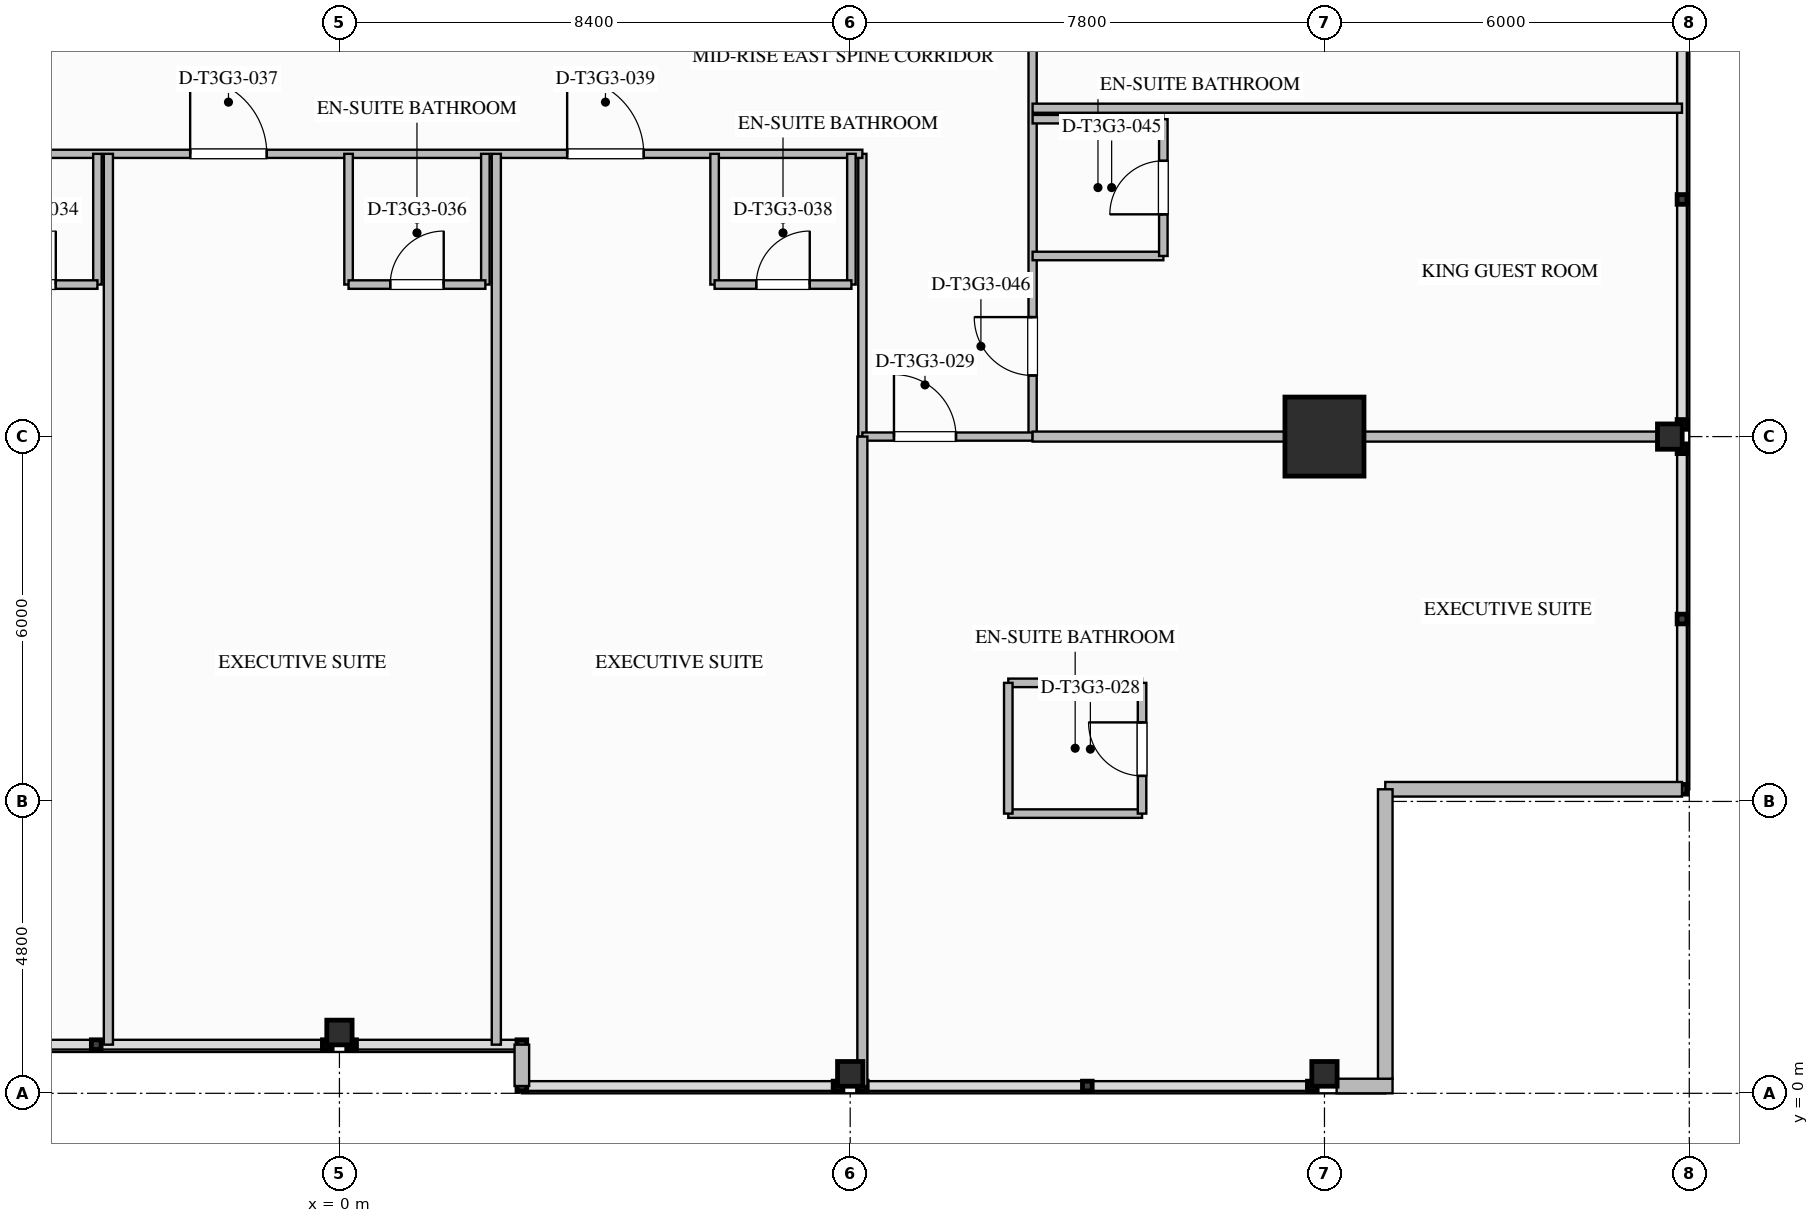
"""IFC4 building model, lengths in metres.
Left out: names, types, materials, properties, quantities, classifications, styles, units other than length and angle.
Written with IfcOpenShell. Run it as: python <this file> out.ifc"""

import sys

from ifc_helpers import new_model, si_unit, direction, frame, frame_2d, origin, origin_2d, place, context, subcontext, project, spatial, rectangle, i_section, extrude, element, fill, save


model = new_model("IFC4")
c1 = context("Model", 3, precision=1e-05, world=origin(), true_north=direction((0.0, 1.0)))
c2 = subcontext(c1, "Body", "Model", "MODEL_VIEW")
j1 = project(units=[si_unit("LENGTHUNIT", "METRE"), si_unit("PLANEANGLEUNIT", "RADIAN")], contexts=[c1])
p1 = place(None, origin())
s1 = spatial("IfcSite", under=j1, at=p1, CompositionType="ELEMENT")
p2 = place(p1, origin())
s2 = spatial("IfcBuilding", under=s1, at=p2, CompositionType="ELEMENT")
p3 = place(p2, frame((0.0, 0.0, 171.7)))
s3 = spatial("IfcBuildingStorey", under=s2, at=p3, CompositionType="ELEMENT", Elevation=171.7)
p4 = place(p3, frame((16.2, 10.8, 0.0), z_axis=(0.0, 0.0, 1.0), x_axis=(1.0, 0.0, 0.0)))
e1 = element("IfcColumn", 1, at=p4, inside=s3, PredefinedType="COLUMN", context=c2, shape_type="SweptSolid", body=[
    extrude(rectangle(XDim=1.3, YDim=1.3, at=origin_2d()), origin(), (0.0, 0.0, 1.0), 3.55),
])
for number, where, z_axis, x_axis in (
    (2, (21.88, 10.8, 0.0), (0.0, 0.0, 1.0), (1.0, 0.0, 0.0)),
    (3, (0.0, 1.0, 0.0), (0.0, 0.0, 1.0), (0.0, 1.0, 0.0)),
    (4, (8.4, 0.32, 0.0), (0.0, 0.0, 1.0), (0.0, 1.0, 0.0)),
    (5, (16.2, 0.32, 0.0), (0.0, 0.0, 1.0), (0.0, 1.0, 0.0)),
):
    element("IfcColumn", number, at=place(p3, frame(where, z_axis=z_axis, x_axis=x_axis)), inside=s3, PredefinedType="COLUMN", context=c2, shape_type="SweptSolid", body=[
        extrude(i_section(OverallWidth=0.406, OverallDepth=0.416, WebThickness=0.03, FlangeThickness=0.048, FilletRadius=0.028, at=origin_2d()), origin(), (0.0, 0.0, 1.0), 3.547),
    ])
p5 = place(p3, frame((17.32, 0.12, 0.0), z_axis=(0.0, 0.0, 1.0), x_axis=(-1.0, 0.0, 0.0)))
e6 = element("IfcWall", 6, at=p5, inside=s3, PredefinedType="STANDARD", context=c2, shape_type="SweptSolid", body=[
    extrude(rectangle(XDim=0.92, YDim=0.24, at=frame_2d((0.46, 0.0))), origin(), (0.0, 0.0, 1.0), 3.29),
])
p6 = place(p3, frame((22.08, 5.0, 0.0), z_axis=(0.0, 0.0, 1.0), x_axis=(-1.0, 0.0, 0.0)))
e7 = element("IfcWall", 7, at=p6, inside=s3, PredefinedType="STANDARD", context=c2, shape_type="SweptSolid", body=[
    extrude(rectangle(XDim=4.88, YDim=0.24, at=frame_2d((2.44, 0.0))), origin(), (0.0, 0.0, 1.0), 3.29),
])
p7 = place(p3, frame((17.2, 5.0, 0.0), z_axis=(0.0, 0.0, 1.0), x_axis=(0.0, -1.0, 0.0)))
e8 = element("IfcWall", 8, at=p7, inside=s3, PredefinedType="STANDARD", context=c2, shape_type="SweptSolid", body=[
    extrude(rectangle(XDim=4.76, YDim=0.24, at=frame_2d((2.38, 0.0))), origin(), (0.0, 0.0, 1.0), 3.29),
])
p8 = place(p3, frame((3.0, 0.12, 0.0), z_axis=(0.0, 0.0, 1.0), x_axis=(0.0, 1.0, 0.0)))
e9 = element("IfcWall", 9, at=p8, inside=s3, PredefinedType="STANDARD", context=c2, shape_type="SweptSolid", body=[
    extrude(rectangle(XDim=0.68, YDim=0.24, at=frame_2d((0.34, 0.0))), origin(), (0.0, 0.0, 1.0), 3.29),
])
p9 = place(p3, frame((8.6, 10.8, 0.0), z_axis=(0.0, 0.0, 1.0), x_axis=(0.0, 1.0, 0.0)))
e10 = element("IfcWall", 10, at=p9, inside=s3, PredefinedType="PARTITIONING", context=c2, shape_type="SweptSolid", body=[
    extrude(rectangle(XDim=4.65, YDim=0.135, at=frame_2d((2.325, 0.0))), origin(), (0.0, 0.0, 1.0), 2.667),
])
p10 = place(p3, frame((-16.2, 15.45, 0.0), z_axis=(0.0, 0.0, 1.0), x_axis=(1.0, 0.0, 0.0)))
e11 = element("IfcWall", 11, at=p10, inside=s3, PredefinedType="PARTITIONING", context=c2, shape_type="SweptSolid", body=[
    extrude(rectangle(XDim=24.8, YDim=0.135, at=frame_2d((12.4, 0.0))), origin(), (0.0, 0.0, 1.0), 3.29),
])
p11 = place(p10, frame((1.875, 0.0, 0.0)))
e12 = element("IfcOpeningElement", 12, at=p11, cuts=e11, PredefinedType="OPENING", context=c2, shape_type="SweptSolid", body=[
    extrude(rectangle(XDim=1.26, YDim=2.2, at=frame_2d((0.63, 1.1))), frame((0.0, 0.077, 0.0), z_axis=(0.0, -1.0, 0.0), x_axis=(1.0, 0.0, 0.0)), (0.0, 0.0, 1.0), 0.155),
])
p12 = place(p10, frame((8.225, 0.0, 0.0)))
e13 = element("IfcOpeningElement", 13, at=p12, cuts=e11, PredefinedType="OPENING", context=c2, shape_type="SweptSolid", body=[
    extrude(rectangle(XDim=0.96, YDim=2.15, at=frame_2d((0.48, 1.075))), frame((0.0, 0.077, 0.0), z_axis=(0.0, -1.0, 0.0), x_axis=(1.0, 0.0, 0.0)), (0.0, 0.0, 1.0), 0.155),
])
p13 = place(p10, frame((13.745, 0.0, 0.0)))
e14 = element("IfcOpeningElement", 14, at=p13, cuts=e11, PredefinedType="OPENING", context=c2, shape_type="SweptSolid", body=[
    extrude(rectangle(XDim=1.26, YDim=2.2, at=frame_2d((0.63, 1.1))), frame((0.0, 0.077, 0.0), z_axis=(0.0, -1.0, 0.0), x_axis=(1.0, 0.0, 0.0)), (0.0, 0.0, 1.0), 0.155),
])
p14 = place(p10, frame((19.945, 0.0, 0.0)))
e15 = element("IfcOpeningElement", 15, at=p14, cuts=e11, PredefinedType="OPENING", context=c2, shape_type="SweptSolid", body=[
    extrude(rectangle(XDim=1.26, YDim=2.2, at=frame_2d((0.63, 1.1))), frame((0.0, 0.077, 0.0), z_axis=(0.0, -1.0, 0.0), x_axis=(1.0, 0.0, 0.0)), (0.0, 0.0, 1.0), 0.155),
])
p15 = place(p3, frame((11.4, 10.8, 0.0), z_axis=(0.0, 0.0, 1.0), x_axis=(0.0, 1.0, 0.0)))
e16 = element("IfcWall", 16, at=p15, inside=s3, PredefinedType="PARTITIONING", context=c2, shape_type="SweptSolid", body=[
    extrude(rectangle(XDim=32.4, YDim=0.135, at=frame_2d((16.2, 0.0))), origin(), (0.0, 0.0, 1.0), 3.29),
])
p16 = place(p15, frame((1.005, 0.0, 0.0)))
e17 = element("IfcOpeningElement", 17, at=p16, cuts=e16, PredefinedType="OPENING", context=c2, shape_type="SweptSolid", body=[
    extrude(rectangle(XDim=0.96, YDim=2.15, at=frame_2d((0.48, 1.075))), frame((0.0, 0.077, 0.0), z_axis=(0.0, -1.0, 0.0), x_axis=(1.0, 0.0, 0.0)), (0.0, 0.0, 1.0), 0.155),
])
p17 = place(p15, frame((8.94, 0.0, 0.0)))
e18 = element("IfcOpeningElement", 18, at=p17, cuts=e16, PredefinedType="OPENING", context=c2, shape_type="SweptSolid", body=[
    extrude(rectangle(XDim=1.02, YDim=2.15, at=frame_2d((0.51, 1.075))), frame((0.0, 0.077, 0.0), z_axis=(0.0, -1.0, 0.0), x_axis=(1.0, 0.0, 0.0)), (0.0, 0.0, 1.0), 0.155),
])
p18 = place(p15, frame((14.445, 0.0, 0.0)))
e19 = element("IfcOpeningElement", 19, at=p18, cuts=e16, PredefinedType="OPENING", context=c2, shape_type="SweptSolid", body=[
    extrude(rectangle(XDim=0.96, YDim=2.15, at=frame_2d((0.48, 1.075))), frame((0.0, 0.077, 0.0), z_axis=(0.0, -1.0, 0.0), x_axis=(1.0, 0.0, 0.0)), (0.0, 0.0, 1.0), 0.155),
])
p19 = place(p15, frame((22.38, 0.0, 0.0)))
e20 = element("IfcOpeningElement", 20, at=p19, cuts=e16, PredefinedType="OPENING", context=c2, shape_type="SweptSolid", body=[
    extrude(rectangle(XDim=1.02, YDim=2.15, at=frame_2d((0.51, 1.075))), frame((0.0, 0.077, 0.0), z_axis=(0.0, -1.0, 0.0), x_axis=(1.0, 0.0, 0.0)), (0.0, 0.0, 1.0), 0.155),
])
p20 = place(p15, frame((28.005, 0.0, 0.0)))
e21 = element("IfcOpeningElement", 21, at=p20, cuts=e16, PredefinedType="OPENING", context=c2, shape_type="SweptSolid", body=[
    extrude(rectangle(XDim=0.96, YDim=2.15, at=frame_2d((0.48, 1.075))), frame((0.0, 0.077, 0.0), z_axis=(0.0, -1.0, 0.0), x_axis=(1.0, 0.0, 0.0)), (0.0, 0.0, 1.0), 0.155),
])
p21 = place(p3, frame((8.6, 10.8, 0.0), z_axis=(0.0, 0.0, 1.0), x_axis=(1.0, 0.0, 0.0)))
e22 = element("IfcWall", 22, at=p21, inside=s3, PredefinedType="PARTITIONING", context=c2, shape_type="SweptSolid", body=[
    extrude(rectangle(XDim=2.8, YDim=0.135, at=frame_2d((1.4, 0.0))), origin(), (0.0, 0.0, 1.0), 2.58),
])
p22 = place(p21, frame((0.52, 0.0, 0.0)))
e23 = element("IfcOpeningElement", 23, at=p22, cuts=e22, PredefinedType="OPENING", context=c2, shape_type="SweptSolid", body=[
    extrude(rectangle(XDim=1.02, YDim=2.15, at=frame_2d((0.51, 1.075))), frame((0.0, 0.077, 0.0), z_axis=(0.0, -1.0, 0.0), x_axis=(1.0, 0.0, 0.0)), (0.0, 0.0, 1.0), 0.155),
])
p23 = place(p3, frame((8.6, 0.12, 0.0), z_axis=(0.0, 0.0, 1.0), x_axis=(0.0, 1.0, 0.0)))
e24 = element("IfcWall", 24, at=p23, inside=s3, PredefinedType="PARTITIONING", context=c2, shape_type="SweptSolid", body=[
    extrude(rectangle(XDim=10.68, YDim=0.165, at=frame_2d((5.34, 0.0))), origin(), (0.0, 0.0, 1.0), 2.58),
])
p24 = place(p3, frame((11.4, 10.8, 0.0), z_axis=(0.0, 0.0, 1.0), x_axis=(1.0, 0.0, 0.0)))
e25 = element("IfcWall", 25, at=p24, inside=s3, PredefinedType="PARTITIONING", context=c2, shape_type="SweptSolid", body=[
    extrude(rectangle(XDim=10.68, YDim=0.165, at=frame_2d((5.34, 0.0))), origin(), (0.0, 0.0, 1.0), 2.58),
])
for number, where, z_axis, x_axis in (
    (26, (11.0, 4.6, 0.0), (0.0, 0.0, 1.0), (1.0, 0.0, 0.0)),
    (27, (11.0, 6.75, 0.0), (0.0, 0.0, 1.0), (1.0, 0.0, 0.0)),
):
    element("IfcWall", number, at=place(p3, frame(where, z_axis=z_axis, x_axis=x_axis)), inside=s3, PredefinedType="PLUMBINGWALL", context=c2, shape_type="SweptSolid", body=[
        extrude(rectangle(XDim=2.2, YDim=0.14, at=frame_2d((1.1, 0.0))), origin(), (0.0, 0.0, 1.0), 3.29),
    ])
p25 = place(p3, frame((11.0, 4.6, 0.0), z_axis=(0.0, 0.0, 1.0), x_axis=(0.0, 1.0, 0.0)))
e28 = element("IfcWall", 28, at=p25, inside=s3, PredefinedType="PLUMBINGWALL", context=c2, shape_type="SweptSolid", body=[
    extrude(rectangle(XDim=2.15, YDim=0.14, at=frame_2d((1.075, 0.0))), origin(), (0.0, 0.0, 1.0), 3.29),
])
p26 = place(p3, frame((13.2, 4.6, 0.0), z_axis=(0.0, 0.0, 1.0), x_axis=(0.0, 1.0, 0.0)))
e29 = element("IfcWall", 29, at=p26, inside=s3, PredefinedType="PLUMBINGWALL", context=c2, shape_type="SweptSolid", body=[
    extrude(rectangle(XDim=2.15, YDim=0.14, at=frame_2d((1.075, 0.0))), origin(), (0.0, 0.0, 1.0), 3.29),
])
p27 = place(p26, frame((0.62, 0.0, 0.0)))
e30 = element("IfcOpeningElement", 30, at=p27, cuts=e29, PredefinedType="OPENING", context=c2, shape_type="SweptSolid", body=[
    extrude(rectangle(XDim=0.88, YDim=2.1, at=frame_2d((0.44, 1.05))), frame((0.0, 0.08, 0.0), z_axis=(0.0, -1.0, 0.0), x_axis=(1.0, 0.0, 0.0)), (0.0, 0.0, 1.0), 0.16),
])
p28 = place(p3, frame((-3.98, 15.45, 0.0), z_axis=(0.0, 0.0, 1.0), x_axis=(0.0, -1.0, 0.0)))
e31 = element("IfcWall", 31, at=p28, inside=s3, PredefinedType="PLUMBINGWALL", context=c2, shape_type="SweptSolid", body=[
    extrude(rectangle(XDim=2.15, YDim=0.14, at=frame_2d((1.075, 0.0))), origin(), (0.0, 0.0, 1.0), 3.29),
])
p29 = place(p3, frame((-6.23, 13.3, 0.0), z_axis=(0.0, 0.0, 1.0), x_axis=(1.0, 0.0, 0.0)))
e32 = element("IfcWall", 32, at=p29, inside=s3, PredefinedType="PLUMBINGWALL", context=c2, shape_type="SweptSolid", body=[
    extrude(rectangle(XDim=2.25, YDim=0.14, at=frame_2d((1.125, 0.0))), origin(), (0.0, 0.0, 1.0), 3.29),
])
p30 = place(p29, frame((0.685, 0.0, 0.0)))
e33 = element("IfcOpeningElement", 33, at=p30, cuts=e32, PredefinedType="OPENING", context=c2, shape_type="SweptSolid", body=[
    extrude(rectangle(XDim=0.88, YDim=2.1, at=frame_2d((0.44, 1.05))), frame((0.0, 0.08, 0.0), z_axis=(0.0, -1.0, 0.0), x_axis=(1.0, 0.0, 0.0)), (0.0, 0.0, 1.0), 0.16),
])
p31 = place(p3, frame((-3.8, 0.8, 0.0), z_axis=(0.0, 0.0, 1.0), x_axis=(0.0, 1.0, 0.0)))
e34 = element("IfcWall", 34, at=p31, inside=s3, PredefinedType="PARTITIONING", context=c2, shape_type="SweptSolid", body=[
    extrude(rectangle(XDim=14.65, YDim=0.15, at=frame_2d((7.325, 0.0))), origin(), (0.0, 0.0, 1.0), 3.29),
])
p32 = place(p3, frame((0.15, 15.45, 0.0), z_axis=(0.0, 0.0, 1.0), x_axis=(0.0, -1.0, 0.0)))
e35 = element("IfcWall", 35, at=p32, inside=s3, PredefinedType="PLUMBINGWALL", context=c2, shape_type="SweptSolid", body=[
    extrude(rectangle(XDim=2.15, YDim=0.14, at=frame_2d((1.075, 0.0))), origin(), (0.0, 0.0, 1.0), 2.667),
])
p33 = place(p3, frame((2.4, 15.45, 0.0), z_axis=(0.0, 0.0, 1.0), x_axis=(0.0, -1.0, 0.0)))
e36 = element("IfcWall", 36, at=p33, inside=s3, PredefinedType="PLUMBINGWALL", context=c2, shape_type="SweptSolid", body=[
    extrude(rectangle(XDim=2.15, YDim=0.14, at=frame_2d((1.075, 0.0))), origin(), (0.0, 0.0, 1.0), 3.29),
])
p34 = place(p3, frame((0.15, 13.3, 0.0), z_axis=(0.0, 0.0, 1.0), x_axis=(1.0, 0.0, 0.0)))
e37 = element("IfcWall", 37, at=p34, inside=s3, PredefinedType="PLUMBINGWALL", context=c2, shape_type="SweptSolid", body=[
    extrude(rectangle(XDim=2.25, YDim=0.14, at=frame_2d((1.125, 0.0))), origin(), (0.0, 0.0, 1.0), 3.29),
])
p35 = place(p34, frame((0.685, 0.0, 0.0)))
e38 = element("IfcOpeningElement", 38, at=p35, cuts=e37, PredefinedType="OPENING", context=c2, shape_type="SweptSolid", body=[
    extrude(rectangle(XDim=0.88, YDim=2.1, at=frame_2d((0.44, 1.05))), frame((0.0, 0.08, 0.0), z_axis=(0.0, -1.0, 0.0), x_axis=(1.0, 0.0, 0.0)), (0.0, 0.0, 1.0), 0.16),
])
p36 = place(p3, frame((2.58, 0.8, 0.0), z_axis=(0.0, 0.0, 1.0), x_axis=(0.0, 1.0, 0.0)))
e39 = element("IfcWall", 39, at=p36, inside=s3, PredefinedType="PARTITIONING", context=c2, shape_type="SweptSolid", body=[
    extrude(rectangle(XDim=14.65, YDim=0.15, at=frame_2d((7.325, 0.0))), origin(), (0.0, 0.0, 1.0), 3.29),
])
p37 = place(p3, frame((6.17, 15.45, 0.0), z_axis=(0.0, 0.0, 1.0), x_axis=(0.0, -1.0, 0.0)))
e40 = element("IfcWall", 40, at=p37, inside=s3, PredefinedType="PLUMBINGWALL", context=c2, shape_type="SweptSolid", body=[
    extrude(rectangle(XDim=2.15, YDim=0.14, at=frame_2d((1.075, 0.0))), origin(), (0.0, 0.0, 1.0), 3.29),
])
p38 = place(p3, frame((8.42, 15.45, 0.0), z_axis=(0.0, 0.0, 1.0), x_axis=(0.0, -1.0, 0.0)))
e41 = element("IfcWall", 41, at=p38, inside=s3, PredefinedType="PLUMBINGWALL", context=c2, shape_type="SweptSolid", body=[
    extrude(rectangle(XDim=2.15, YDim=0.14, at=frame_2d((1.075, 0.0))), origin(), (0.0, 0.0, 1.0), 2.667),
])
p39 = place(p3, frame((6.17, 13.3, 0.0), z_axis=(0.0, 0.0, 1.0), x_axis=(1.0, 0.0, 0.0)))
e42 = element("IfcWall", 42, at=p39, inside=s3, PredefinedType="PLUMBINGWALL", context=c2, shape_type="SweptSolid", body=[
    extrude(rectangle(XDim=2.25, YDim=0.14, at=frame_2d((1.125, 0.0))), origin(), (0.0, 0.0, 1.0), 3.29),
])
p40 = place(p39, frame((0.685, 0.0, 0.0)))
e43 = element("IfcOpeningElement", 43, at=p40, cuts=e42, PredefinedType="OPENING", context=c2, shape_type="SweptSolid", body=[
    extrude(rectangle(XDim=0.88, YDim=2.1, at=frame_2d((0.44, 1.05))), frame((0.0, 0.08, 0.0), z_axis=(0.0, -1.0, 0.0), x_axis=(1.0, 0.0, 0.0)), (0.0, 0.0, 1.0), 0.16),
])
for number, where, z_axis, x_axis in (
    (44, (11.4, 13.77, 0.0), (0.0, 0.0, 1.0), (1.0, 0.0, 0.0)),
    (45, (11.4, 16.02, 0.0), (0.0, 0.0, 1.0), (1.0, 0.0, 0.0)),
):
    element("IfcWall", number, at=place(p3, frame(where, z_axis=z_axis, x_axis=x_axis)), inside=s3, PredefinedType="PLUMBINGWALL", context=c2, shape_type="SweptSolid", body=[
        extrude(rectangle(XDim=2.15, YDim=0.14, at=frame_2d((1.075, 0.0))), origin(), (0.0, 0.0, 1.0), 3.29),
    ])
p41 = place(p3, frame((13.55, 13.77, 0.0), z_axis=(0.0, 0.0, 1.0), x_axis=(0.0, 1.0, 0.0)))
e46 = element("IfcWall", 46, at=p41, inside=s3, PredefinedType="PLUMBINGWALL", context=c2, shape_type="SweptSolid", body=[
    extrude(rectangle(XDim=2.25, YDim=0.14, at=frame_2d((1.125, 0.0))), origin(), (0.0, 0.0, 1.0), 3.29),
])
p42 = place(p41, frame((0.685, 0.0, 0.0)))
e47 = element("IfcOpeningElement", 47, at=p42, cuts=e46, PredefinedType="OPENING", context=c2, shape_type="SweptSolid", body=[
    extrude(rectangle(XDim=0.88, YDim=2.1, at=frame_2d((0.44, 1.05))), frame((0.0, 0.08, 0.0), z_axis=(0.0, -1.0, 0.0), x_axis=(1.0, 0.0, 0.0)), (0.0, 0.0, 1.0), 0.16),
])
p43 = place(p3, frame((11.4, 16.2, 0.0), z_axis=(0.0, 0.0, 1.0), x_axis=(1.0, 0.0, 0.0)))
e48 = element("IfcWall", 48, at=p43, inside=s3, PredefinedType="PARTITIONING", context=c2, shape_type="SweptSolid", body=[
    extrude(rectangle(XDim=10.68, YDim=0.15, at=frame_2d((5.34, 0.0))), origin(), (0.0, 0.0, 1.0), 3.29),
])
p44 = place(p27, origin())
e49 = element("IfcDoor", 49, at=p44, inside=s3, OperationType="SINGLE_SWING_RIGHT", PredefinedType="DOOR", context=c2, shape_type="SweptSolid", body=[
    extrude(rectangle(XDim=0.88, YDim=2.1, at=frame_2d((0.44, 1.05))), frame((0.0, 0.025, 0.0), z_axis=(0.0, -1.0, 0.0), x_axis=(1.0, 0.0, 0.0)), (0.0, 0.0, 1.0), 0.05),
])
fill(e30, e49)
p45 = place(p22, origin())
e50 = element("IfcDoor", 50, at=p45, inside=s3, OperationType="SINGLE_SWING_LEFT", PredefinedType="DOOR", context=c2, shape_type="SweptSolid", body=[
    extrude(rectangle(XDim=1.02, YDim=2.15, at=frame_2d((0.51, 1.075))), frame((0.0, 0.025, 0.0), z_axis=(0.0, -1.0, 0.0), x_axis=(1.0, 0.0, 0.0)), (0.0, 0.0, 1.0), 0.05),
])
fill(e23, e50)
p46 = place(p30, origin())
e51 = element("IfcDoor", 51, at=p46, inside=s3, OperationType="SINGLE_SWING_RIGHT", PredefinedType="DOOR", context=c2, shape_type="SweptSolid", body=[
    extrude(rectangle(XDim=0.88, YDim=2.1, at=frame_2d((0.44, 1.05))), frame((0.0, 0.025, 0.0), z_axis=(0.0, -1.0, 0.0), x_axis=(1.0, 0.0, 0.0)), (0.0, 0.0, 1.0), 0.05),
])
fill(e33, e51)
p47 = place(p35, origin())
e52 = element("IfcDoor", 52, at=p47, inside=s3, OperationType="SINGLE_SWING_RIGHT", PredefinedType="DOOR", context=c2, shape_type="SweptSolid", body=[
    extrude(rectangle(XDim=0.88, YDim=2.1, at=frame_2d((0.44, 1.05))), frame((0.0, 0.025, 0.0), z_axis=(0.0, -1.0, 0.0), x_axis=(1.0, 0.0, 0.0)), (0.0, 0.0, 1.0), 0.05),
])
fill(e38, e52)
p48 = place(p13, origin())
e53 = element("IfcDoor", 53, at=p48, inside=s3, OperationType="SINGLE_SWING_LEFT", PredefinedType="DOOR", context=c2, shape_type="SweptSolid", body=[
    extrude(rectangle(XDim=1.26, YDim=2.2, at=frame_2d((0.63, 1.1))), frame((0.0, 0.025, 0.0), z_axis=(0.0, -1.0, 0.0), x_axis=(1.0, 0.0, 0.0)), (0.0, 0.0, 1.0), 0.05),
])
fill(e14, e53)
p49 = place(p40, origin())
e54 = element("IfcDoor", 54, at=p49, inside=s3, OperationType="SINGLE_SWING_RIGHT", PredefinedType="DOOR", context=c2, shape_type="SweptSolid", body=[
    extrude(rectangle(XDim=0.88, YDim=2.1, at=frame_2d((0.44, 1.05))), frame((0.0, 0.025, 0.0), z_axis=(0.0, -1.0, 0.0), x_axis=(1.0, 0.0, 0.0)), (0.0, 0.0, 1.0), 0.05),
])
fill(e43, e54)
p50 = place(p14, origin())
e55 = element("IfcDoor", 55, at=p50, inside=s3, OperationType="SINGLE_SWING_LEFT", PredefinedType="DOOR", context=c2, shape_type="SweptSolid", body=[
    extrude(rectangle(XDim=1.26, YDim=2.2, at=frame_2d((0.63, 1.1))), frame((0.0, 0.025, 0.0), z_axis=(0.0, -1.0, 0.0), x_axis=(1.0, 0.0, 0.0)), (0.0, 0.0, 1.0), 0.05),
])
fill(e15, e55)
p51 = place(p42, origin())
e56 = element("IfcDoor", 56, at=p51, inside=s3, OperationType="SINGLE_SWING_LEFT", PredefinedType="DOOR", context=c2, shape_type="SweptSolid", body=[
    extrude(rectangle(XDim=0.88, YDim=2.1, at=frame_2d((0.44, 1.05))), frame((0.0, 0.025, 0.0), z_axis=(0.0, -1.0, 0.0), x_axis=(1.0, 0.0, 0.0)), (0.0, 0.0, 1.0), 0.05),
])
fill(e47, e56)
p52 = place(p16, origin())
e57 = element("IfcDoor", 57, at=p52, inside=s3, OperationType="SINGLE_SWING_RIGHT", PredefinedType="DOOR", context=c2, shape_type="SweptSolid", body=[
    extrude(rectangle(XDim=0.96, YDim=2.15, at=frame_2d((0.48, 1.075))), frame((0.0, 0.025, 0.0), z_axis=(0.0, -1.0, 0.0), x_axis=(1.0, 0.0, 0.0)), (0.0, 0.0, 1.0), 0.05),
])
fill(e17, e57)
save(model, sys.argv[1])
